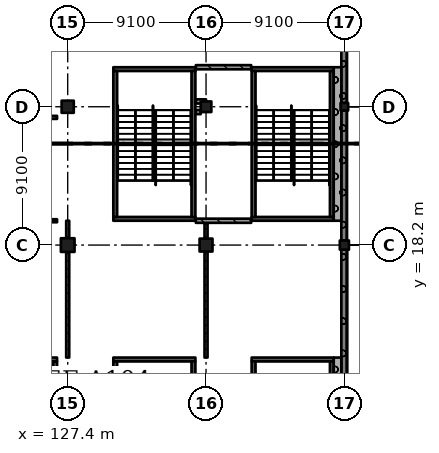
"""IFC4 building model, lengths in metres.
Left out: names, types, materials, properties, quantities, classifications, styles, units other than length and angle.
Written with IfcOpenShell. Run it as: python <this file> out.ifc"""

import sys

from ifc_helpers import new_model, si_unit, direction, frame, frame_2d, origin, origin_2d, place, context, subcontext, project, spatial, rectangle, extrude, element, fill, save


model = new_model("IFC4")
c1 = context("Model", 3, precision=1e-05, world=origin(), true_north=direction((0.0, 1.0)))
c2 = subcontext(c1, "Body", "Model", "MODEL_VIEW")
j1 = project(units=[si_unit("LENGTHUNIT", "METRE"), si_unit("PLANEANGLEUNIT", "RADIAN")], contexts=[c1])
p1 = place(None, origin())
s1 = spatial("IfcSite", under=j1, at=p1, CompositionType="ELEMENT")
p2 = place(p1, origin())
s2 = spatial("IfcBuilding", under=s1, at=p2, CompositionType="ELEMENT")
p3 = place(p2, origin())
s3 = spatial("IfcBuildingStorey", under=s2, at=p3, CompositionType="ELEMENT", Elevation=0.0)
p4 = place(p3, frame((127.4, 18.2, -0.4), z_axis=(0.0, 0.0, 1.0), x_axis=(1.0, 0.0, 0.0)))
e1 = element("IfcColumn", 1, at=p4, inside=s3, PredefinedType="COLUMN", context=c2, shape_type="SweptSolid", body=[
    extrude(rectangle(XDim=0.9, YDim=0.9, at=origin_2d()), origin(), (0.0, 0.0, 1.0), 6.77),
])
p5 = place(p3, frame((127.4, 27.3, -0.4), z_axis=(0.0, 0.0, 1.0), x_axis=(1.0, 0.0, 0.0)))
e2 = element("IfcColumn", 2, at=p5, inside=s3, PredefinedType="COLUMN", context=c2, shape_type="SweptSolid", body=[
    extrude(rectangle(XDim=0.8, YDim=0.8, at=origin_2d()), origin(), (0.0, 0.0, 1.0), 6.77),
])
p6 = place(p3, frame((136.5, 18.2, -0.4), z_axis=(0.0, 0.0, 1.0), x_axis=(1.0, 0.0, 0.0)))
e3 = element("IfcColumn", 3, at=p6, inside=s3, PredefinedType="COLUMN", context=c2, shape_type="SweptSolid", body=[
    extrude(rectangle(XDim=0.85, YDim=0.85, at=origin_2d()), origin(), (0.0, 0.0, 1.0), 6.77),
])
p7 = place(p3, frame((136.5, 27.3, -0.4), z_axis=(0.0, 0.0, 1.0), x_axis=(1.0, 0.0, 0.0)))
e4 = element("IfcColumn", 4, at=p7, inside=s3, PredefinedType="COLUMN", context=c2, shape_type="SweptSolid", body=[
    extrude(rectangle(XDim=0.7, YDim=0.7, at=origin_2d()), origin(), (0.0, 0.0, 1.0), 6.77),
])
p8 = place(p3, frame((145.6, 18.2, -0.4), z_axis=(0.0, 0.0, 1.0), x_axis=(1.0, 0.0, 0.0)))
e5 = element("IfcColumn", 5, at=p8, inside=s3, PredefinedType="COLUMN", context=c2, shape_type="SweptSolid", body=[
    extrude(rectangle(XDim=0.6, YDim=0.6, at=origin_2d()), origin(), (0.0, 0.0, 1.0), 6.77),
])
p9 = place(p3, frame((145.6, 27.3, -0.4), z_axis=(0.0, 0.0, 1.0), x_axis=(1.0, 0.0, 0.0)))
e6 = element("IfcColumn", 6, at=p9, inside=s3, PredefinedType="COLUMN", context=c2, shape_type="SweptSolid", body=[
    extrude(rectangle(XDim=0.5, YDim=0.5, at=origin_2d()), origin(), (0.0, 0.0, 1.0), 6.77),
])
p10 = place(p3, frame((144.9, 10.675, -0.4), z_axis=(0.0, 0.0, 1.0), x_axis=(-1.0, 0.0, 0.0)))
e7 = element("IfcWall", 7, at=p10, inside=s3, PredefinedType="SHEAR", context=c2, shape_type="SweptSolid", body=[
    extrude(rectangle(XDim=5.4, YDim=0.25, at=frame_2d((2.7, 0.0))), origin(), (0.0, 0.0, 1.0), 6.77),
])
p11 = place(p10, frame((1.5, 0.0, 0.4)))
e8 = element("IfcOpeningElement", 8, at=p11, cuts=e7, PredefinedType="OPENING", context=c2, shape_type="SweptSolid", body=[
    extrude(rectangle(XDim=2.4, YDim=2.1, at=frame_2d((1.2, 1.05))), frame((0.0, 0.135, 0.0), z_axis=(0.0, -1.0, 0.0), x_axis=(1.0, 0.0, 0.0)), (0.0, 0.0, 1.0), 0.27),
])
p12 = place(p3, frame((139.625, 10.55, -0.4), z_axis=(0.0, 0.0, 1.0), x_axis=(0.0, -1.0, 0.0)))
e9 = element("IfcWall", 9, at=p12, inside=s3, PredefinedType="SHEAR", context=c2, shape_type="SweptSolid", body=[
    extrude(rectangle(XDim=9.6, YDim=0.25, at=frame_2d((4.8, 0.0))), origin(), (0.0, 0.0, 1.0), 6.77),
])
p13 = place(p12, frame((0.45, 0.0, 0.4)))
e10 = element("IfcOpeningElement", 10, at=p13, cuts=e9, PredefinedType="OPENING", context=c2, shape_type="SweptSolid", body=[
    extrude(rectangle(XDim=1.2, YDim=2.1, at=frame_2d((0.6, 1.05))), frame((0.0, 0.135, 0.0), z_axis=(0.0, -1.0, 0.0), x_axis=(1.0, 0.0, 0.0)), (0.0, 0.0, 1.0), 0.27),
])
p14 = place(p3, frame((144.775, 10.55, -0.4), z_axis=(0.0, 0.0, 1.0), x_axis=(0.0, -1.0, 0.0)))
e11 = element("IfcWall", 11, at=p14, inside=s3, PredefinedType="SHEAR", context=c2, shape_type="SweptSolid", body=[
    extrude(rectangle(XDim=9.6, YDim=0.25, at=frame_2d((4.8, 0.0))), origin(), (0.0, 0.0, 1.0), 6.77),
])
p15 = place(p3, frame((135.8, 10.675, -0.4), z_axis=(0.0, 0.0, 1.0), x_axis=(-1.0, 0.0, 0.0)))
e12 = element("IfcWall", 12, at=p15, inside=s3, PredefinedType="SHEAR", context=c2, shape_type="SweptSolid", body=[
    extrude(rectangle(XDim=5.4, YDim=0.25, at=frame_2d((2.7, 0.0))), origin(), (0.0, 0.0, 1.0), 6.77),
])
p16 = place(p15, frame((1.5, 0.0, 0.4)))
e13 = element("IfcOpeningElement", 13, at=p16, cuts=e12, PredefinedType="OPENING", context=c2, shape_type="SweptSolid", body=[
    extrude(rectangle(XDim=2.4, YDim=2.1, at=frame_2d((1.2, 1.05))), frame((0.0, 0.135, 0.0), z_axis=(0.0, -1.0, 0.0), x_axis=(1.0, 0.0, 0.0)), (0.0, 0.0, 1.0), 0.27),
])
p17 = place(p3, frame((130.525, 10.55, -0.4), z_axis=(0.0, 0.0, 1.0), x_axis=(0.0, -1.0, 0.0)))
e14 = element("IfcWall", 14, at=p17, inside=s3, PredefinedType="SHEAR", context=c2, shape_type="SweptSolid", body=[
    extrude(rectangle(XDim=9.6, YDim=0.25, at=frame_2d((4.8, 0.0))), origin(), (0.0, 0.0, 1.0), 6.77),
])
p18 = place(p17, frame((0.45, 0.0, 0.4)))
e15 = element("IfcOpeningElement", 15, at=p18, cuts=e14, PredefinedType="OPENING", context=c2, shape_type="SweptSolid", body=[
    extrude(rectangle(XDim=1.2, YDim=2.1, at=frame_2d((0.6, 1.05))), frame((0.0, 0.135, 0.0), z_axis=(0.0, -1.0, 0.0), x_axis=(1.0, 0.0, 0.0)), (0.0, 0.0, 1.0), 0.27),
])
p19 = place(p3, frame((135.675, 10.55, -0.4), z_axis=(0.0, 0.0, 1.0), x_axis=(0.0, -1.0, 0.0)))
e16 = element("IfcWall", 16, at=p19, inside=s3, PredefinedType="SHEAR", context=c2, shape_type="SweptSolid", body=[
    extrude(rectangle(XDim=9.6, YDim=0.25, at=frame_2d((4.8, 0.0))), origin(), (0.0, 0.0, 1.0), 6.77),
])
p20 = place(p3, frame((126.7, 10.675, -0.4), z_axis=(0.0, 0.0, 1.0), x_axis=(-1.0, 0.0, 0.0)))
e17 = element("IfcWall", 17, at=p20, inside=s3, PredefinedType="SHEAR", context=c2, shape_type="SweptSolid", body=[
    extrude(rectangle(XDim=5.4, YDim=0.25, at=frame_2d((2.7, 0.0))), origin(), (0.0, 0.0, 1.0), 6.77),
])
p21 = place(p20, frame((1.5, 0.0, 0.4)))
e18 = element("IfcOpeningElement", 18, at=p21, cuts=e17, PredefinedType="OPENING", context=c2, shape_type="SweptSolid", body=[
    extrude(rectangle(XDim=2.4, YDim=2.1, at=frame_2d((1.2, 1.05))), frame((0.0, 0.135, 0.0), z_axis=(0.0, -1.0, 0.0), x_axis=(1.0, 0.0, 0.0)), (0.0, 0.0, 1.0), 0.27),
])
p22 = place(p3, frame((126.575, 10.55, -0.4), z_axis=(0.0, 0.0, 1.0), x_axis=(0.0, -1.0, 0.0)))
e19 = element("IfcWall", 19, at=p22, inside=s3, PredefinedType="SHEAR", context=c2, shape_type="SweptSolid", body=[
    extrude(rectangle(XDim=9.6, YDim=0.25, at=frame_2d((4.8, 0.0))), origin(), (0.0, 0.0, 1.0), 6.77),
])
p23 = place(p3, frame((144.9, 19.925, -0.4), z_axis=(0.0, 0.0, 1.0), x_axis=(-1.0, 0.0, 0.0)))
e20 = element("IfcWall", 20, at=p23, inside=s3, PredefinedType="SHEAR", context=c2, shape_type="SweptSolid", body=[
    extrude(rectangle(XDim=5.4, YDim=0.25, at=frame_2d((2.7, 0.0))), origin(), (0.0, 0.0, 1.0), 6.77),
])
p24 = place(p23, frame((1.5, 0.0, 0.4)))
e21 = element("IfcOpeningElement", 21, at=p24, cuts=e20, PredefinedType="OPENING", context=c2, shape_type="SweptSolid", body=[
    extrude(rectangle(XDim=2.4, YDim=2.1, at=frame_2d((1.2, 1.05))), frame((0.0, 0.135, 0.0), z_axis=(0.0, -1.0, 0.0), x_axis=(1.0, 0.0, 0.0)), (0.0, 0.0, 1.0), 0.27),
])
p25 = place(p3, frame((144.9, 29.775, -0.4), z_axis=(0.0, 0.0, 1.0), x_axis=(-1.0, 0.0, 0.0)))
e22 = element("IfcWall", 22, at=p25, inside=s3, PredefinedType="SHEAR", context=c2, shape_type="SweptSolid", body=[
    extrude(rectangle(XDim=5.4, YDim=0.25, at=frame_2d((2.7, 0.0))), origin(), (0.0, 0.0, 1.0), 6.77),
])
for number, where, z_axis, x_axis in (
    (23, (139.625, 29.65, -0.4), (0.0, 0.0, 1.0), (0.0, -1.0, 0.0)),
    (24, (144.775, 29.65, -0.4), (0.0, 0.0, 1.0), (0.0, -1.0, 0.0)),
):
    element("IfcWall", number, at=place(p3, frame(where, z_axis=z_axis, x_axis=x_axis)), inside=s3, PredefinedType="SHEAR", context=c2, shape_type="SweptSolid", body=[
        extrude(rectangle(XDim=9.6, YDim=0.25, at=frame_2d((4.8, 0.0))), origin(), (0.0, 0.0, 1.0), 6.77),
    ])
p26 = place(p3, frame((135.8, 19.925, -0.4), z_axis=(0.0, 0.0, 1.0), x_axis=(-1.0, 0.0, 0.0)))
e25 = element("IfcWall", 25, at=p26, inside=s3, PredefinedType="SHEAR", context=c2, shape_type="SweptSolid", body=[
    extrude(rectangle(XDim=5.4, YDim=0.25, at=frame_2d((2.7, 0.0))), origin(), (0.0, 0.0, 1.0), 6.77),
])
p27 = place(p26, frame((1.5, 0.0, 0.4)))
e26 = element("IfcOpeningElement", 26, at=p27, cuts=e25, PredefinedType="OPENING", context=c2, shape_type="SweptSolid", body=[
    extrude(rectangle(XDim=2.4, YDim=2.1, at=frame_2d((1.2, 1.05))), frame((0.0, 0.135, 0.0), z_axis=(0.0, -1.0, 0.0), x_axis=(1.0, 0.0, 0.0)), (0.0, 0.0, 1.0), 0.27),
])
p28 = place(p3, frame((135.8, 29.775, -0.4), z_axis=(0.0, 0.0, 1.0), x_axis=(-1.0, 0.0, 0.0)))
e27 = element("IfcWall", 27, at=p28, inside=s3, PredefinedType="SHEAR", context=c2, shape_type="SweptSolid", body=[
    extrude(rectangle(XDim=5.4, YDim=0.25, at=frame_2d((2.7, 0.0))), origin(), (0.0, 0.0, 1.0), 6.77),
])
for number, where, z_axis, x_axis in (
    (28, (130.525, 29.65, -0.4), (0.0, 0.0, 1.0), (0.0, -1.0, 0.0)),
    (29, (135.675, 29.65, -0.4), (0.0, 0.0, 1.0), (0.0, -1.0, 0.0)),
):
    element("IfcWall", number, at=place(p3, frame(where, z_axis=z_axis, x_axis=x_axis)), inside=s3, PredefinedType="SHEAR", context=c2, shape_type="SweptSolid", body=[
        extrude(rectangle(XDim=9.6, YDim=0.25, at=frame_2d((4.8, 0.0))), origin(), (0.0, 0.0, 1.0), 6.77),
    ])
p29 = place(p3, frame((145.575, 9.375, 0.0), z_axis=(0.0, 0.0, 1.0), x_axis=(0.0, 1.0, 0.0)))
e30 = element("IfcWall", 30, at=p29, inside=s3, PredefinedType="SOLIDWALL", context=c2, shape_type="SweptSolid", body=[
    extrude(rectangle(XDim=8.525, YDim=0.35, at=frame_2d((4.262, 0.0))), origin(), (0.0, 0.0, 1.0), 5.27),
])
p30 = place(p29, frame((1.625, 0.0, 0.0)))
e31 = element("IfcOpeningElement", 31, at=p30, cuts=e30, PredefinedType="OPENING", context=c2, shape_type="SweptSolid", body=[
    extrude(rectangle(XDim=2.4, YDim=2.4, at=frame_2d((1.2, 1.2))), frame((0.0, 0.185, 0.0), z_axis=(0.0, -1.0, 0.0), x_axis=(1.0, 0.0, 0.0)), (0.0, 0.0, 1.0), 0.37),
])
p31 = place(p29, frame((4.625, 0.0, 0.0)))
e32 = element("IfcOpeningElement", 32, at=p31, cuts=e30, PredefinedType="OPENING", context=c2, shape_type="SweptSolid", body=[
    extrude(rectangle(XDim=2.4, YDim=2.4, at=frame_2d((1.2, 1.2))), frame((0.0, 0.185, 0.0), z_axis=(0.0, -1.0, 0.0), x_axis=(1.0, 0.0, 0.0)), (0.0, 0.0, 1.0), 0.37),
])
p32 = place(p3, frame((145.575, 18.5, 0.0), z_axis=(0.0, 0.0, 1.0), x_axis=(0.0, 1.0, 0.0)))
e33 = element("IfcWall", 33, at=p32, inside=s3, PredefinedType="SOLIDWALL", context=c2, shape_type="SweptSolid", body=[
    extrude(rectangle(XDim=8.55, YDim=0.35, at=frame_2d((4.275, 0.0))), origin(), (0.0, 0.0, 1.0), 5.27),
])
p33 = place(p3, frame((145.575, 27.55, 0.0), z_axis=(0.0, 0.0, 1.0), x_axis=(0.0, 1.0, 0.0)))
e34 = element("IfcWall", 34, at=p33, inside=s3, PredefinedType="SOLIDWALL", context=c2, shape_type="SweptSolid", body=[
    extrude(rectangle(XDim=8.525, YDim=0.35, at=frame_2d((4.262, 0.0))), origin(), (0.0, 0.0, 1.0), 5.27),
])
p34 = place(p3, frame((145.15, 0.7, 0.0), z_axis=(0.0, 0.0, 1.0), x_axis=(0.0, 1.0, 0.0)))
e35 = element("IfcWall", 35, at=p34, inside=s3, PredefinedType="SOLIDWALL", context=c2, shape_type="SweptSolid", body=[
    extrude(rectangle(XDim=10.1, YDim=0.5, at=frame_2d((5.05, 0.0))), origin(), (0.0, 0.0, 1.0), 6.37),
])
p35 = place(p3, frame((145.15, 19.8, 0.0), z_axis=(0.0, 0.0, 1.0), x_axis=(0.0, 1.0, 0.0)))
e36 = element("IfcWall", 36, at=p35, inside=s3, PredefinedType="SOLIDWALL", context=c2, shape_type="SweptSolid", body=[
    extrude(rectangle(XDim=10.1, YDim=0.5, at=frame_2d((5.05, 0.0))), origin(), (0.0, 0.0, 1.0), 6.37),
])
p36 = place(p3, frame((121.3, 19.8, 0.0), z_axis=(0.0, 0.0, 1.0), x_axis=(1.0, 0.0, 0.0)))
e37 = element("IfcWall", 37, at=p36, inside=s3, PredefinedType="PARTITIONING", context=c2, shape_type="SweptSolid", body=[
    extrude(rectangle(XDim=5.4, YDim=0.2, at=frame_2d((2.7, 0.0))), origin(), (0.0, 0.0, 1.0), 6.02),
])
p37 = place(p36, frame((1.85, 0.0, 0.0)))
e38 = element("IfcOpeningElement", 38, at=p37, cuts=e37, PredefinedType="OPENING", context=c2, shape_type="SweptSolid", body=[
    extrude(rectangle(XDim=1.8, YDim=2.4, at=frame_2d((0.9, 1.2))), frame((0.0, 0.11, 0.0), z_axis=(0.0, -1.0, 0.0), x_axis=(1.0, 0.0, 0.0)), (0.0, 0.0, 1.0), 0.22),
])
p38 = place(p3, frame((126.13, 26.6, 0.0), z_axis=(0.0, 0.0, 1.0), x_axis=(1.0, 0.0, 0.0)))
e39 = element("IfcWall", 39, at=p38, inside=s3, PredefinedType="PARTITIONING", context=c2, shape_type="SweptSolid", body=[
    extrude(rectangle(XDim=0.57, YDim=0.2, at=frame_2d((0.285, 0.0))), origin(), (0.0, 0.0, 1.0), 6.02),
])
p39 = place(p3, frame((127.4, 10.8, 0.0), z_axis=(0.0, 0.0, 1.0), x_axis=(0.0, 1.0, 0.0)))
e40 = element("IfcWall", 40, at=p39, inside=s3, PredefinedType="PARTITIONING", context=c2, shape_type="SweptSolid", body=[
    extrude(rectangle(XDim=6.95, YDim=0.2, at=frame_2d((3.475, 0.0))), origin(), (0.0, 0.0, 1.0), 5.32),
])
p40 = place(p39, frame((0.85, 0.0, 0.0)))
e41 = element("IfcOpeningElement", 41, at=p40, cuts=e40, PredefinedType="OPENING", context=c2, shape_type="SweptSolid", body=[
    extrude(rectangle(XDim=1.8, YDim=2.4, at=frame_2d((0.9, 1.2))), frame((0.0, 0.11, 0.0), z_axis=(0.0, -1.0, 0.0), x_axis=(1.0, 0.0, 0.0)), (0.0, 0.0, 1.0), 0.22),
])
p41 = place(p39, frame((4.35, 0.0, 0.0)))
e42 = element("IfcOpeningElement", 42, at=p41, cuts=e40, PredefinedType="OPENING", context=c2, shape_type="SweptSolid", body=[
    extrude(rectangle(XDim=1.8, YDim=2.4, at=frame_2d((0.9, 1.2))), frame((0.0, 0.11, 0.0), z_axis=(0.0, -1.0, 0.0), x_axis=(1.0, 0.0, 0.0)), (0.0, 0.0, 1.0), 0.22),
])
p42 = place(p3, frame((127.4, 18.65, 0.0), z_axis=(0.0, 0.0, 1.0), x_axis=(0.0, 1.0, 0.0)))
e43 = element("IfcWall", 43, at=p42, inside=s3, PredefinedType="PARTITIONING", context=c2, shape_type="SweptSolid", body=[
    extrude(rectangle(XDim=1.15, YDim=0.2, at=frame_2d((0.575, 0.0))), origin(), (0.0, 0.0, 1.0), 5.32),
])
p43 = place(p3, frame((135.83, 19.8, 0.0), z_axis=(0.0, 0.0, 1.0), x_axis=(1.0, 0.0, 0.0)))
e44 = element("IfcWall", 44, at=p43, inside=s3, PredefinedType="SOLIDWALL", context=c2, shape_type="SweptSolid", body=[
    extrude(rectangle(XDim=3.64, YDim=0.275, at=frame_2d((1.82, 0.0))), origin(), (0.0, 0.0, 1.0), 6.02),
])
p44 = place(p43, frame((1.52, 0.0, 0.0)))
e45 = element("IfcOpeningElement", 45, at=p44, cuts=e44, PredefinedType="OPENING", context=c2, shape_type="SweptSolid", body=[
    extrude(rectangle(XDim=1.2, YDim=2.4, at=frame_2d((0.6, 1.2))), frame((0.0, 0.147, 0.0), z_axis=(0.0, -1.0, 0.0), x_axis=(1.0, 0.0, 0.0)), (0.0, 0.0, 1.0), 0.295),
])
p45 = place(p3, frame((135.83, 26.95, 0.0), z_axis=(0.0, 0.0, 1.0), x_axis=(1.0, 0.0, 0.0)))
e46 = element("IfcWall", 46, at=p45, inside=s3, PredefinedType="SOLIDWALL", context=c2, shape_type="SweptSolid", body=[
    extrude(rectangle(XDim=0.32, YDim=0.275, at=frame_2d((0.16, 0.0))), origin(), (0.0, 0.0, 1.0), 6.02),
])
p46 = place(p3, frame((135.83, 27.65, 0.0), z_axis=(0.0, 0.0, 1.0), x_axis=(1.0, 0.0, 0.0)))
e47 = element("IfcWall", 47, at=p46, inside=s3, PredefinedType="SOLIDWALL", context=c2, shape_type="SweptSolid", body=[
    extrude(rectangle(XDim=0.67, YDim=0.275, at=frame_2d((0.335, 0.0))), origin(), (0.0, 0.0, 1.0), 6.02),
])
p47 = place(p3, frame((135.83, 29.9, 0.0), z_axis=(0.0, 0.0, 1.0), x_axis=(1.0, 0.0, 0.0)))
e48 = element("IfcWall", 48, at=p47, inside=s3, PredefinedType="SOLIDWALL", context=c2, shape_type="SweptSolid", body=[
    extrude(rectangle(XDim=3.64, YDim=0.275, at=frame_2d((1.82, 0.0))), origin(), (0.0, 0.0, 1.0), 6.02),
])
p48 = place(p3, frame((136.5, 10.8, 0.0), z_axis=(0.0, 0.0, 1.0), x_axis=(0.0, 1.0, 0.0)))
e49 = element("IfcWall", 49, at=p48, inside=s3, PredefinedType="PARTITIONING", context=c2, shape_type="SweptSolid", body=[
    extrude(rectangle(XDim=6.975, YDim=0.2, at=frame_2d((3.487, 0.0))), origin(), (0.0, 0.0, 1.0), 5.32),
])
p49 = place(p48, frame((0.85, 0.0, 0.0)))
e50 = element("IfcOpeningElement", 50, at=p49, cuts=e49, PredefinedType="OPENING", context=c2, shape_type="SweptSolid", body=[
    extrude(rectangle(XDim=1.8, YDim=2.4, at=frame_2d((0.9, 1.2))), frame((0.0, 0.11, 0.0), z_axis=(0.0, -1.0, 0.0), x_axis=(1.0, 0.0, 0.0)), (0.0, 0.0, 1.0), 0.22),
])
p50 = place(p48, frame((4.35, 0.0, 0.0)))
e51 = element("IfcOpeningElement", 51, at=p50, cuts=e49, PredefinedType="OPENING", context=c2, shape_type="SweptSolid", body=[
    extrude(rectangle(XDim=1.8, YDim=2.4, at=frame_2d((0.9, 1.2))), frame((0.0, 0.11, 0.0), z_axis=(0.0, -1.0, 0.0), x_axis=(1.0, 0.0, 0.0)), (0.0, 0.0, 1.0), 0.22),
])
p51 = place(p3, frame((136.5, 18.625, 0.0), z_axis=(0.0, 0.0, 1.0), x_axis=(0.0, 1.0, 0.0)))
e52 = element("IfcWall", 52, at=p51, inside=s3, PredefinedType="PARTITIONING", context=c2, shape_type="SweptSolid", body=[
    extrude(rectangle(XDim=1.038, YDim=0.2, at=frame_2d((0.519, 0.0))), origin(), (0.0, 0.0, 1.0), 5.32),
])
p52 = place(p30, frame((2.4, 0.0, 0.0), z_axis=(0.0, 0.0, 1.0), x_axis=(-1.0, 0.0, 0.0)))
e53 = element("IfcDoor", 53, at=p52, inside=s3, OperationType="DOUBLE_DOOR_SINGLE_SWING", PredefinedType="DOOR", context=c2, shape_type="SweptSolid", body=[
    extrude(rectangle(XDim=2.4, YDim=2.4, at=frame_2d((1.2, 1.2))), frame((0.0, 0.025, 0.0), z_axis=(0.0, -1.0, 0.0), x_axis=(1.0, 0.0, 0.0)), (0.0, 0.0, 1.0), 0.05),
])
fill(e31, e53)
p53 = place(p31, frame((2.4, 0.0, 0.0), z_axis=(0.0, 0.0, 1.0), x_axis=(-1.0, 0.0, 0.0)))
e54 = element("IfcDoor", 54, at=p53, inside=s3, OperationType="DOUBLE_DOOR_SINGLE_SWING", PredefinedType="DOOR", context=c2, shape_type="SweptSolid", body=[
    extrude(rectangle(XDim=2.4, YDim=2.4, at=frame_2d((1.2, 1.2))), frame((0.0, 0.025, 0.0), z_axis=(0.0, -1.0, 0.0), x_axis=(1.0, 0.0, 0.0)), (0.0, 0.0, 1.0), 0.05),
])
fill(e32, e54)
p54 = place(p44, origin())
e55 = element("IfcDoor", 55, at=p54, inside=s3, OperationType="SINGLE_SWING_RIGHT", PredefinedType="DOOR", context=c2, shape_type="SweptSolid", body=[
    extrude(rectangle(XDim=1.2, YDim=2.4, at=frame_2d((0.6, 1.2))), frame((0.0, 0.025, 0.0), z_axis=(0.0, -1.0, 0.0), x_axis=(1.0, 0.0, 0.0)), (0.0, 0.0, 1.0), 0.05),
])
fill(e45, e55)
p55 = place(p49, origin())
e56 = element("IfcDoor", 56, at=p55, inside=s3, OperationType="DOUBLE_DOOR_SINGLE_SWING", PredefinedType="DOOR", context=c2, shape_type="SweptSolid", body=[
    extrude(rectangle(XDim=1.8, YDim=2.4, at=frame_2d((0.9, 1.2))), frame((0.0, 0.025, 0.0), z_axis=(0.0, -1.0, 0.0), x_axis=(1.0, 0.0, 0.0)), (0.0, 0.0, 1.0), 0.05),
])
fill(e50, e56)
p56 = place(p50, origin())
e57 = element("IfcDoor", 57, at=p56, inside=s3, OperationType="DOUBLE_DOOR_SINGLE_SWING", PredefinedType="DOOR", context=c2, shape_type="SweptSolid", body=[
    extrude(rectangle(XDim=1.8, YDim=2.4, at=frame_2d((0.9, 1.2))), frame((0.0, 0.025, 0.0), z_axis=(0.0, -1.0, 0.0), x_axis=(1.0, 0.0, 0.0)), (0.0, 0.0, 1.0), 0.05),
])
fill(e51, e57)
p57 = place(p40, origin())
e58 = element("IfcDoor", 58, at=p57, inside=s3, OperationType="DOUBLE_DOOR_SINGLE_SWING", PredefinedType="DOOR", context=c2, shape_type="SweptSolid", body=[
    extrude(rectangle(XDim=1.8, YDim=2.4, at=frame_2d((0.9, 1.2))), frame((0.0, 0.025, 0.0), z_axis=(0.0, -1.0, 0.0), x_axis=(1.0, 0.0, 0.0)), (0.0, 0.0, 1.0), 0.05),
])
fill(e41, e58)
p58 = place(p41, origin())
e59 = element("IfcDoor", 59, at=p58, inside=s3, OperationType="DOUBLE_DOOR_SINGLE_SWING", PredefinedType="DOOR", context=c2, shape_type="SweptSolid", body=[
    extrude(rectangle(XDim=1.8, YDim=2.4, at=frame_2d((0.9, 1.2))), frame((0.0, 0.025, 0.0), z_axis=(0.0, -1.0, 0.0), x_axis=(1.0, 0.0, 0.0)), (0.0, 0.0, 1.0), 0.05),
])
fill(e42, e59)
p59 = place(p11, origin())
e60 = element("IfcDoor", 60, at=p59, inside=s3, OperationType="DOUBLE_DOOR_SINGLE_SWING", PredefinedType="DOOR", context=c2, shape_type="SweptSolid", body=[
    extrude(rectangle(XDim=2.4, YDim=2.1, at=frame_2d((1.2, 1.05))), frame((0.0, 0.025, 0.0), z_axis=(0.0, -1.0, 0.0), x_axis=(1.0, 0.0, 0.0)), (0.0, 0.0, 1.0), 0.05),
])
fill(e8, e60)
p60 = place(p16, origin())
e61 = element("IfcDoor", 61, at=p60, inside=s3, OperationType="DOUBLE_DOOR_SINGLE_SWING", PredefinedType="DOOR", context=c2, shape_type="SweptSolid", body=[
    extrude(rectangle(XDim=2.4, YDim=2.1, at=frame_2d((1.2, 1.05))), frame((0.0, 0.025, 0.0), z_axis=(0.0, -1.0, 0.0), x_axis=(1.0, 0.0, 0.0)), (0.0, 0.0, 1.0), 0.05),
])
fill(e13, e61)
p61 = place(p24, origin())
e62 = element("IfcDoor", 62, at=p61, inside=s3, OperationType="DOUBLE_DOOR_SINGLE_SWING", PredefinedType="DOOR", context=c2, shape_type="SweptSolid", body=[
    extrude(rectangle(XDim=2.4, YDim=2.1, at=frame_2d((1.2, 1.05))), frame((0.0, 0.025, 0.0), z_axis=(0.0, -1.0, 0.0), x_axis=(1.0, 0.0, 0.0)), (0.0, 0.0, 1.0), 0.05),
])
fill(e21, e62)
p62 = place(p27, origin())
e63 = element("IfcDoor", 63, at=p62, inside=s3, OperationType="DOUBLE_DOOR_SINGLE_SWING", PredefinedType="DOOR", context=c2, shape_type="SweptSolid", body=[
    extrude(rectangle(XDim=2.4, YDim=2.1, at=frame_2d((1.2, 1.05))), frame((0.0, 0.025, 0.0), z_axis=(0.0, -1.0, 0.0), x_axis=(1.0, 0.0, 0.0)), (0.0, 0.0, 1.0), 0.05),
])
fill(e26, e63)
p63 = place(p13, origin())
e64 = element("IfcDoor", 64, at=p63, inside=s3, OperationType="SINGLE_SWING_LEFT", PredefinedType="DOOR", context=c2, shape_type="SweptSolid", body=[
    extrude(rectangle(XDim=1.2, YDim=2.1, at=frame_2d((0.6, 1.05))), frame((0.0, 0.025, 0.0), z_axis=(0.0, -1.0, 0.0), x_axis=(1.0, 0.0, 0.0)), (0.0, 0.0, 1.0), 0.05),
])
fill(e10, e64)
p64 = place(p18, origin())
e65 = element("IfcDoor", 65, at=p64, inside=s3, OperationType="SINGLE_SWING_LEFT", PredefinedType="DOOR", context=c2, shape_type="SweptSolid", body=[
    extrude(rectangle(XDim=1.2, YDim=2.1, at=frame_2d((0.6, 1.05))), frame((0.0, 0.025, 0.0), z_axis=(0.0, -1.0, 0.0), x_axis=(1.0, 0.0, 0.0)), (0.0, 0.0, 1.0), 0.05),
])
fill(e15, e65)
save(model, sys.argv[1])
